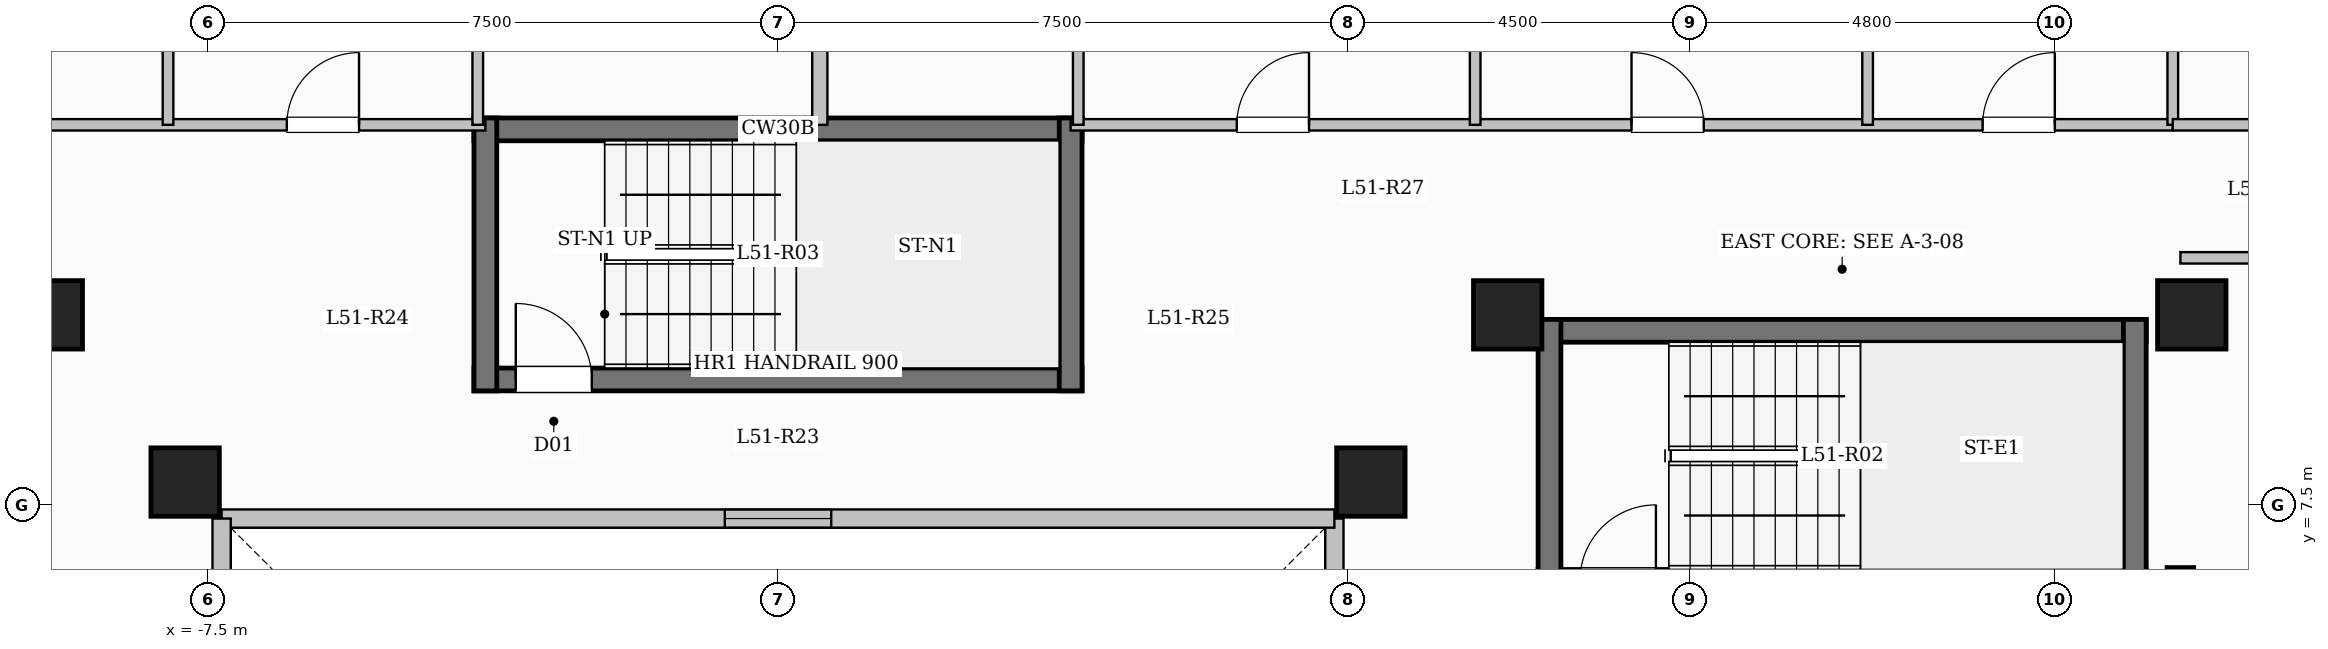
"""IFC4 building model, lengths in metres.
Left out: names, types, materials, properties, quantities, classifications, styles, units other than length and angle.
Written with IfcOpenShell. Run it as: python <this file> out.ifc"""

import sys

from ifc_helpers import new_model, si_unit, direction, frame, frame_2d, origin, origin_2d, place, context, subcontext, project, spatial, rectangle, extrude, element, fill, save


model = new_model("IFC4")
c1 = context("Model", 3, precision=1e-05, world=origin(), true_north=direction((0.0, 1.0)))
c2 = subcontext(c1, "Body", "Model", "MODEL_VIEW")
j1 = project(units=[si_unit("LENGTHUNIT", "METRE"), si_unit("PLANEANGLEUNIT", "RADIAN")], contexts=[c1])
p1 = place(None, origin())
s1 = spatial("IfcSite", under=j1, at=p1, CompositionType="ELEMENT")
p2 = place(p1, origin())
s2 = spatial("IfcBuilding", under=s1, at=p2, CompositionType="ELEMENT")
p3 = place(p2, frame((0.0, 0.0, 190.25)))
s3 = spatial("IfcBuildingStorey", under=s2, at=p3, CompositionType="ELEMENT", Elevation=190.25)
for number, where, z_axis, x_axis in (
    (1, (-7.8, 7.8, 0.0), (0.0, 0.0, 1.0), (1.0, 0.0, 0.0)),
    (2, (7.8, 7.8, 0.0), (0.0, 0.0, 1.0), (1.0, 0.0, 0.0)),
    (3, (-9.6, 10.0, 0.0), (0.0, 0.0, 1.0), (1.0, 0.0, 0.0)),
    (4, (9.6, 10.0, 0.0), (0.0, 0.0, 1.0), (1.0, 0.0, 0.0)),
    (5, (18.6, 10.0, 0.0), (0.0, 0.0, 1.0), (1.0, 0.0, 0.0)),
):
    element("IfcColumn", number, at=place(p3, frame(where, z_axis=z_axis, x_axis=x_axis)), inside=s3, PredefinedType="COLUMN", context=c2, shape_type="SweptSolid", body=[
        extrude(rectangle(XDim=0.9, YDim=0.9, at=origin_2d()), origin(), (0.0, 0.0, 1.0), 3.35),
    ])
p4 = place(p3, frame((7.32, -7.32, 0.0), z_axis=(0.0, 0.0, 1.0), x_axis=(0.0, 1.0, 0.0)))
e6 = element("IfcWall", 6, at=p4, inside=s3, PredefinedType="SOLIDWALL", context=c2, shape_type="SweptSolid", body=[
    extrude(rectangle(XDim=14.64, YDim=0.24, at=frame_2d((7.32, 0.0))), origin(), (0.0, 0.0, 1.0), 3.1),
])
p5 = place(p4, frame((6.62, 0.0, 0.95)))
e7 = element("IfcOpeningElement", 7, at=p5, cuts=e6, PredefinedType="OPENING", context=c2, shape_type="SweptSolid", body=[
    extrude(rectangle(XDim=1.4, YDim=1.5, at=frame_2d((0.7, 0.75))), frame((0.0, 0.13, 0.0), z_axis=(0.0, -1.0, 0.0), x_axis=(1.0, 0.0, 0.0)), (0.0, 0.0, 1.0), 0.26),
])
p6 = place(p3, frame((7.32, 7.32, 0.0), z_axis=(0.0, 0.0, 1.0), x_axis=(-1.0, 0.0, 0.0)))
e8 = element("IfcWall", 8, at=p6, inside=s3, PredefinedType="SOLIDWALL", context=c2, shape_type="SweptSolid", body=[
    extrude(rectangle(XDim=14.64, YDim=0.24, at=frame_2d((7.32, 0.0))), origin(), (0.0, 0.0, 1.0), 3.1),
])
p7 = place(p6, frame((6.62, 0.0, 0.95)))
e9 = element("IfcOpeningElement", 9, at=p7, cuts=e8, PredefinedType="OPENING", context=c2, shape_type="SweptSolid", body=[
    extrude(rectangle(XDim=1.4, YDim=1.5, at=frame_2d((0.7, 0.75))), frame((0.0, 0.13, 0.0), z_axis=(0.0, -1.0, 0.0), x_axis=(1.0, 0.0, 0.0)), (0.0, 0.0, 1.0), 0.26),
])
p8 = place(p3, frame((-7.32, 7.32, 0.0), z_axis=(0.0, 0.0, 1.0), x_axis=(0.0, -1.0, 0.0)))
e10 = element("IfcWall", 10, at=p8, inside=s3, PredefinedType="SOLIDWALL", context=c2, shape_type="SweptSolid", body=[
    extrude(rectangle(XDim=14.64, YDim=0.24, at=frame_2d((7.32, 0.0))), origin(), (0.0, 0.0, 1.0), 3.1),
])
p9 = place(p8, frame((6.62, 0.0, 0.95)))
e11 = element("IfcOpeningElement", 11, at=p9, cuts=e10, PredefinedType="OPENING", context=c2, shape_type="SweptSolid", body=[
    extrude(rectangle(XDim=1.4, YDim=1.5, at=frame_2d((0.7, 0.75))), frame((0.0, 0.13, 0.0), z_axis=(0.0, -1.0, 0.0), x_axis=(1.0, 0.0, 0.0)), (0.0, 0.0, 1.0), 0.26),
])
p10 = place(p3, frame((10.0, 9.79, 0.0), z_axis=(0.0, 0.0, 1.0), x_axis=(1.0, 0.0, 0.0)))
e12 = element("IfcWall", 12, at=p10, inside=s3, PredefinedType="SHEAR", context=c2, shape_type="SweptSolid", body=[
    extrude(rectangle(XDim=8.0, YDim=0.3, at=frame_2d((4.0, 0.0))), origin(), (0.0, 0.0, 1.0), 3.35),
])
p11 = place(p3, frame((10.0, 6.5, 0.0), z_axis=(0.0, 0.0, 1.0), x_axis=(1.0, 0.0, 0.0)))
e13 = element("IfcWall", 13, at=p11, inside=s3, PredefinedType="SHEAR", context=c2, shape_type="SweptSolid", body=[
    extrude(rectangle(XDim=8.0, YDim=0.3, at=frame_2d((4.0, 0.0))), origin(), (0.0, 0.0, 1.0), 3.35),
])
p12 = place(p11, frame((0.55, 0.0, 0.0)))
e14 = element("IfcOpeningElement", 14, at=p12, cuts=e13, PredefinedType="OPENING", context=c2, shape_type="SweptSolid", body=[
    extrude(rectangle(XDim=1.0, YDim=2.15, at=frame_2d((0.5, 1.075))), frame((0.0, 0.16, 0.0), z_axis=(0.0, -1.0, 0.0), x_axis=(1.0, 0.0, 0.0)), (0.0, 0.0, 1.0), 0.32),
])
for number, where, z_axis, x_axis in (
    (15, (10.15, 6.35, 0.0), (0.0, 0.0, 1.0), (0.0, 1.0, 0.0)),
    (16, (17.85, 6.35, 0.0), (0.0, 0.0, 1.0), (0.0, 1.0, 0.0)),
):
    element("IfcWall", number, at=place(p3, frame(where, z_axis=z_axis, x_axis=x_axis)), inside=s3, PredefinedType="SHEAR", context=c2, shape_type="SweptSolid", body=[
        extrude(rectangle(XDim=3.59, YDim=0.3, at=frame_2d((1.795, 0.0))), origin(), (0.0, 0.0, 1.0), 3.35),
    ])
p13 = place(p3, frame((-4.0, 12.44, 0.0), z_axis=(0.0, 0.0, 1.0), x_axis=(1.0, 0.0, 0.0)))
e17 = element("IfcWall", 17, at=p13, inside=s3, PredefinedType="SHEAR", context=c2, shape_type="SweptSolid", body=[
    extrude(rectangle(XDim=8.0, YDim=0.3, at=frame_2d((4.0, 0.0))), origin(), (0.0, 0.0, 1.0), 3.35),
])
p14 = place(p3, frame((-4.0, 9.15, 0.0), z_axis=(0.0, 0.0, 1.0), x_axis=(1.0, 0.0, 0.0)))
e18 = element("IfcWall", 18, at=p14, inside=s3, PredefinedType="SHEAR", context=c2, shape_type="SweptSolid", body=[
    extrude(rectangle(XDim=8.0, YDim=0.3, at=frame_2d((4.0, 0.0))), origin(), (0.0, 0.0, 1.0), 3.35),
])
p15 = place(p14, frame((0.55, 0.0, 0.0)))
e19 = element("IfcOpeningElement", 19, at=p15, cuts=e18, PredefinedType="OPENING", context=c2, shape_type="SweptSolid", body=[
    extrude(rectangle(XDim=1.0, YDim=2.15, at=frame_2d((0.5, 1.075))), frame((0.0, 0.16, 0.0), z_axis=(0.0, -1.0, 0.0), x_axis=(1.0, 0.0, 0.0)), (0.0, 0.0, 1.0), 0.32),
])
for number, where, z_axis, x_axis in (
    (20, (-3.85, 9.0, 0.0), (0.0, 0.0, 1.0), (0.0, 1.0, 0.0)),
    (21, (3.85, 9.0, 0.0), (0.0, 0.0, 1.0), (0.0, 1.0, 0.0)),
):
    element("IfcWall", number, at=place(p3, frame(where, z_axis=z_axis, x_axis=x_axis)), inside=s3, PredefinedType="SHEAR", context=c2, shape_type="SweptSolid", body=[
        extrude(rectangle(XDim=3.59, YDim=0.3, at=frame_2d((1.795, 0.0))), origin(), (0.0, 0.0, 1.0), 3.35),
    ])
p16 = place(p3, frame((18.45, -7.375, 0.0), z_axis=(0.0, 0.0, 1.0), x_axis=(0.0, 1.0, 0.0)))
e22 = element("IfcWall", 22, at=p16, inside=s3, PredefinedType="SHEAR", context=c2, shape_type="SweptSolid", body=[
    extrude(rectangle(XDim=14.05, YDim=0.35, at=frame_2d((7.025, 0.0))), origin(), (0.0, 0.0, 1.0), 3.35),
])
p17 = place(p3, frame((-18.35, 12.5, 0.0), z_axis=(0.0, 0.0, 1.0), x_axis=(1.0, 0.0, 0.0)))
e23 = element("IfcWall", 23, at=p17, inside=s3, PredefinedType="PARTITIONING", context=c2, shape_type="SweptSolid", body=[
    extrude(rectangle(XDim=14.5, YDim=0.15, at=frame_2d((7.25, 0.0))), origin(), (0.0, 0.0, 1.0), 3.1),
])
p18 = place(p17, frame((2.076, 0.0, 0.0)))
e24 = element("IfcOpeningElement", 24, at=p18, cuts=e23, PredefinedType="OPENING", context=c2, shape_type="SweptSolid", body=[
    extrude(rectangle(XDim=0.95, YDim=2.15, at=frame_2d((0.475, 1.075))), frame((0.0, 0.085, 0.0), z_axis=(0.0, -1.0, 0.0), x_axis=(1.0, 0.0, 0.0)), (0.0, 0.0, 1.0), 0.17),
])
p19 = place(p17, frame((7.269, 0.0, 0.0)))
e25 = element("IfcOpeningElement", 25, at=p19, cuts=e23, PredefinedType="OPENING", context=c2, shape_type="SweptSolid", body=[
    extrude(rectangle(XDim=0.95, YDim=2.15, at=frame_2d((0.475, 1.075))), frame((0.0, 0.085, 0.0), z_axis=(0.0, -1.0, 0.0), x_axis=(1.0, 0.0, 0.0)), (0.0, 0.0, 1.0), 0.17),
])
p20 = place(p17, frame((11.888, 0.0, 0.0)))
e26 = element("IfcOpeningElement", 26, at=p20, cuts=e23, PredefinedType="OPENING", context=c2, shape_type="SweptSolid", body=[
    extrude(rectangle(XDim=0.95, YDim=2.15, at=frame_2d((0.475, 1.075))), frame((0.0, 0.085, 0.0), z_axis=(0.0, -1.0, 0.0), x_axis=(1.0, 0.0, 0.0)), (0.0, 0.0, 1.0), 0.17),
])
p21 = place(p3, frame((3.85, 12.5, 0.0), z_axis=(0.0, 0.0, 1.0), x_axis=(1.0, 0.0, 0.0)))
e27 = element("IfcWall", 27, at=p21, inside=s3, PredefinedType="PARTITIONING", context=c2, shape_type="SweptSolid", body=[
    extrude(rectangle(XDim=14.5, YDim=0.15, at=frame_2d((7.25, 0.0))), origin(), (0.0, 0.0, 1.0), 3.1),
])
p22 = place(p21, frame((2.186, 0.0, 0.0)))
e28 = element("IfcOpeningElement", 28, at=p22, cuts=e27, PredefinedType="OPENING", context=c2, shape_type="SweptSolid", body=[
    extrude(rectangle(XDim=0.95, YDim=2.15, at=frame_2d((0.475, 1.075))), frame((0.0, 0.085, 0.0), z_axis=(0.0, -1.0, 0.0), x_axis=(1.0, 0.0, 0.0)), (0.0, 0.0, 1.0), 0.17),
])
p23 = place(p21, frame((7.379, 0.0, 0.0)))
e29 = element("IfcOpeningElement", 29, at=p23, cuts=e27, PredefinedType="OPENING", context=c2, shape_type="SweptSolid", body=[
    extrude(rectangle(XDim=0.95, YDim=2.15, at=frame_2d((0.475, 1.075))), frame((0.0, 0.085, 0.0), z_axis=(0.0, -1.0, 0.0), x_axis=(1.0, 0.0, 0.0)), (0.0, 0.0, 1.0), 0.17),
])
p24 = place(p21, frame((11.998, 0.0, 0.0)))
e30 = element("IfcOpeningElement", 30, at=p24, cuts=e27, PredefinedType="OPENING", context=c2, shape_type="SweptSolid", body=[
    extrude(rectangle(XDim=0.95, YDim=2.15, at=frame_2d((0.475, 1.075))), frame((0.0, 0.085, 0.0), z_axis=(0.0, -1.0, 0.0), x_axis=(1.0, 0.0, 0.0)), (0.0, 0.0, 1.0), 0.17),
])
p25 = place(p3, frame((0.55, 12.5, 0.0), z_axis=(0.0, 0.0, 1.0), x_axis=(0.0, 1.0, 0.0)))
e31 = element("IfcWall", 31, at=p25, inside=s3, PredefinedType="SOLIDWALL", context=c2, shape_type="SweptSolid", body=[
    extrude(rectangle(XDim=9.88, YDim=0.2, at=frame_2d((4.94, 0.0))), origin(), (0.0, 0.0, 1.0), 3.1),
])
p26 = place(p3, frame((-3.95, 12.5, 0.0), z_axis=(0.0, 0.0, 1.0), x_axis=(0.0, 1.0, 0.0)))
e32 = element("IfcWall", 32, at=p26, inside=s3, PredefinedType="PARTITIONING", context=c2, shape_type="SweptSolid", body=[
    extrude(rectangle(XDim=8.35, YDim=0.14, at=frame_2d((4.175, 0.0))), origin(), (0.0, 0.0, 1.0), 3.1),
])
p27 = place(p26, frame((1.2, 0.0, 0.0)))
e33 = element("IfcOpeningElement", 33, at=p27, cuts=e32, PredefinedType="OPENING", context=c2, shape_type="SweptSolid", body=[
    extrude(rectangle(XDim=0.95, YDim=2.15, at=frame_2d((0.475, 1.075))), frame((0.0, 0.08, 0.0), z_axis=(0.0, -1.0, 0.0), x_axis=(1.0, 0.0, 0.0)), (0.0, 0.0, 1.0), 0.16),
])
p28 = place(p3, frame((-8.025, 12.5, 0.0), z_axis=(0.0, 0.0, 1.0), x_axis=(0.0, 1.0, 0.0)))
e34 = element("IfcWall", 34, at=p28, inside=s3, PredefinedType="PARTITIONING", context=c2, shape_type="SweptSolid", body=[
    extrude(rectangle(XDim=8.35, YDim=0.14, at=frame_2d((4.175, 0.0))), origin(), (0.0, 0.0, 1.0), 2.585),
])
p29 = place(p3, frame((3.95, 12.5, 0.0), z_axis=(0.0, 0.0, 1.0), x_axis=(0.0, 1.0, 0.0)))
e35 = element("IfcWall", 35, at=p29, inside=s3, PredefinedType="PARTITIONING", context=c2, shape_type="SweptSolid", body=[
    extrude(rectangle(XDim=8.35, YDim=0.14, at=frame_2d((4.175, 0.0))), origin(), (0.0, 0.0, 1.0), 3.1),
])
p30 = place(p29, frame((1.2, 0.0, 0.0)))
e36 = element("IfcOpeningElement", 36, at=p30, cuts=e35, PredefinedType="OPENING", context=c2, shape_type="SweptSolid", body=[
    extrude(rectangle(XDim=0.95, YDim=2.15, at=frame_2d((0.475, 1.075))), frame((0.0, 0.08, 0.0), z_axis=(0.0, -1.0, 0.0), x_axis=(1.0, 0.0, 0.0)), (0.0, 0.0, 1.0), 0.16),
])
for number, where, z_axis, x_axis in (
    (37, (9.172, 12.5, 0.0), (0.0, 0.0, 1.0), (0.0, 1.0, 0.0)),
    (38, (14.335, 12.5, 0.0), (0.0, 0.0, 1.0), (0.0, 1.0, 0.0)),
):
    element("IfcWall", number, at=place(p3, frame(where, z_axis=z_axis, x_axis=x_axis)), inside=s3, PredefinedType="PARTITIONING", context=c2, shape_type="SweptSolid", body=[
        extrude(rectangle(XDim=8.35, YDim=0.14, at=frame_2d((4.175, 0.0))), origin(), (0.0, 0.0, 1.0), 3.1),
    ])
p31 = place(p3, frame((18.45, 10.75, 0.0), z_axis=(0.0, 0.0, 1.0), x_axis=(1.0, 0.0, 0.0)))
e39 = element("IfcWall", 39, at=p31, inside=s3, PredefinedType="PARTITIONING", context=c2, shape_type="SweptSolid", body=[
    extrude(rectangle(XDim=5.13, YDim=0.15, at=frame_2d((2.565, 0.0))), origin(), (0.0, 0.0, 1.0), 3.1),
])
p32 = place(p3, frame((18.35, 12.5, 0.0), z_axis=(0.0, 0.0, 1.0), x_axis=(0.0, 1.0, 0.0)))
e40 = element("IfcWall", 40, at=p32, inside=s3, PredefinedType="PARTITIONING", context=c2, shape_type="SweptSolid", body=[
    extrude(rectangle(XDim=4.75, YDim=0.14, at=frame_2d((2.375, 0.0))), origin(), (0.0, 0.0, 1.0), 3.1),
])
p33 = place(p3, frame((18.35, 12.5, 0.0), z_axis=(0.0, 0.0, 1.0), x_axis=(1.0, 0.0, 0.0)))
e41 = element("IfcWall", 41, at=p33, inside=s3, PredefinedType="PARTITIONING", context=c2, shape_type="SweptSolid", body=[
    extrude(rectangle(XDim=5.23, YDim=0.15, at=frame_2d((2.615, 0.0))), origin(), (0.0, 0.0, 1.0), 3.1),
])
p34 = place(p33, frame((2.14, 0.0, 0.0)))
e42 = element("IfcOpeningElement", 42, at=p34, cuts=e41, PredefinedType="OPENING", context=c2, shape_type="SweptSolid", body=[
    extrude(rectangle(XDim=0.95, YDim=2.15, at=frame_2d((0.475, 1.075))), frame((0.0, 0.085, 0.0), z_axis=(0.0, -1.0, 0.0), x_axis=(1.0, 0.0, 0.0)), (0.0, 0.0, 1.0), 0.17),
])
p35 = place(p7, origin())
e43 = element("IfcWindow", 43, at=p35, inside=s3, PartitioningType="SINGLE_PANEL", PredefinedType="WINDOW", context=c2, shape_type="SweptSolid", body=[
    extrude(rectangle(XDim=1.4, YDim=1.5, at=frame_2d((0.7, 0.75))), frame((0.0, 0.03, 0.0), z_axis=(0.0, -1.0, 0.0), x_axis=(1.0, 0.0, 0.0)), (0.0, 0.0, 1.0), 0.06),
])
fill(e9, e43)
p36 = place(p15, origin())
e44 = element("IfcDoor", 44, at=p36, inside=s3, OperationType="SINGLE_SWING_LEFT", PredefinedType="DOOR", context=c2, shape_type="SweptSolid", body=[
    extrude(rectangle(XDim=1.0, YDim=2.15, at=frame_2d((0.5, 1.075))), frame((0.0, 0.025, 0.0), z_axis=(0.0, -1.0, 0.0), x_axis=(1.0, 0.0, 0.0)), (0.0, 0.0, 1.0), 0.05),
])
fill(e19, e44)
p37 = place(p20, origin())
e45 = element("IfcDoor", 45, at=p37, inside=s3, OperationType="SINGLE_SWING_RIGHT", PredefinedType="DOOR", context=c2, shape_type="SweptSolid", body=[
    extrude(rectangle(XDim=0.95, YDim=2.15, at=frame_2d((0.475, 1.075))), frame((0.0, 0.025, 0.0), z_axis=(0.0, -1.0, 0.0), x_axis=(1.0, 0.0, 0.0)), (0.0, 0.0, 1.0), 0.05),
])
fill(e26, e45)
p38 = place(p22, origin())
e46 = element("IfcDoor", 46, at=p38, inside=s3, OperationType="SINGLE_SWING_RIGHT", PredefinedType="DOOR", context=c2, shape_type="SweptSolid", body=[
    extrude(rectangle(XDim=0.95, YDim=2.15, at=frame_2d((0.475, 1.075))), frame((0.0, 0.025, 0.0), z_axis=(0.0, -1.0, 0.0), x_axis=(1.0, 0.0, 0.0)), (0.0, 0.0, 1.0), 0.05),
])
fill(e28, e46)
p39 = place(p23, origin())
e47 = element("IfcDoor", 47, at=p39, inside=s3, OperationType="SINGLE_SWING_LEFT", PredefinedType="DOOR", context=c2, shape_type="SweptSolid", body=[
    extrude(rectangle(XDim=0.95, YDim=2.15, at=frame_2d((0.475, 1.075))), frame((0.0, 0.025, 0.0), z_axis=(0.0, -1.0, 0.0), x_axis=(1.0, 0.0, 0.0)), (0.0, 0.0, 1.0), 0.05),
])
fill(e29, e47)
p40 = place(p24, origin())
e48 = element("IfcDoor", 48, at=p40, inside=s3, OperationType="SINGLE_SWING_RIGHT", PredefinedType="DOOR", context=c2, shape_type="SweptSolid", body=[
    extrude(rectangle(XDim=0.95, YDim=2.15, at=frame_2d((0.475, 1.075))), frame((0.0, 0.025, 0.0), z_axis=(0.0, -1.0, 0.0), x_axis=(1.0, 0.0, 0.0)), (0.0, 0.0, 1.0), 0.05),
])
fill(e30, e48)
save(model, sys.argv[1])
